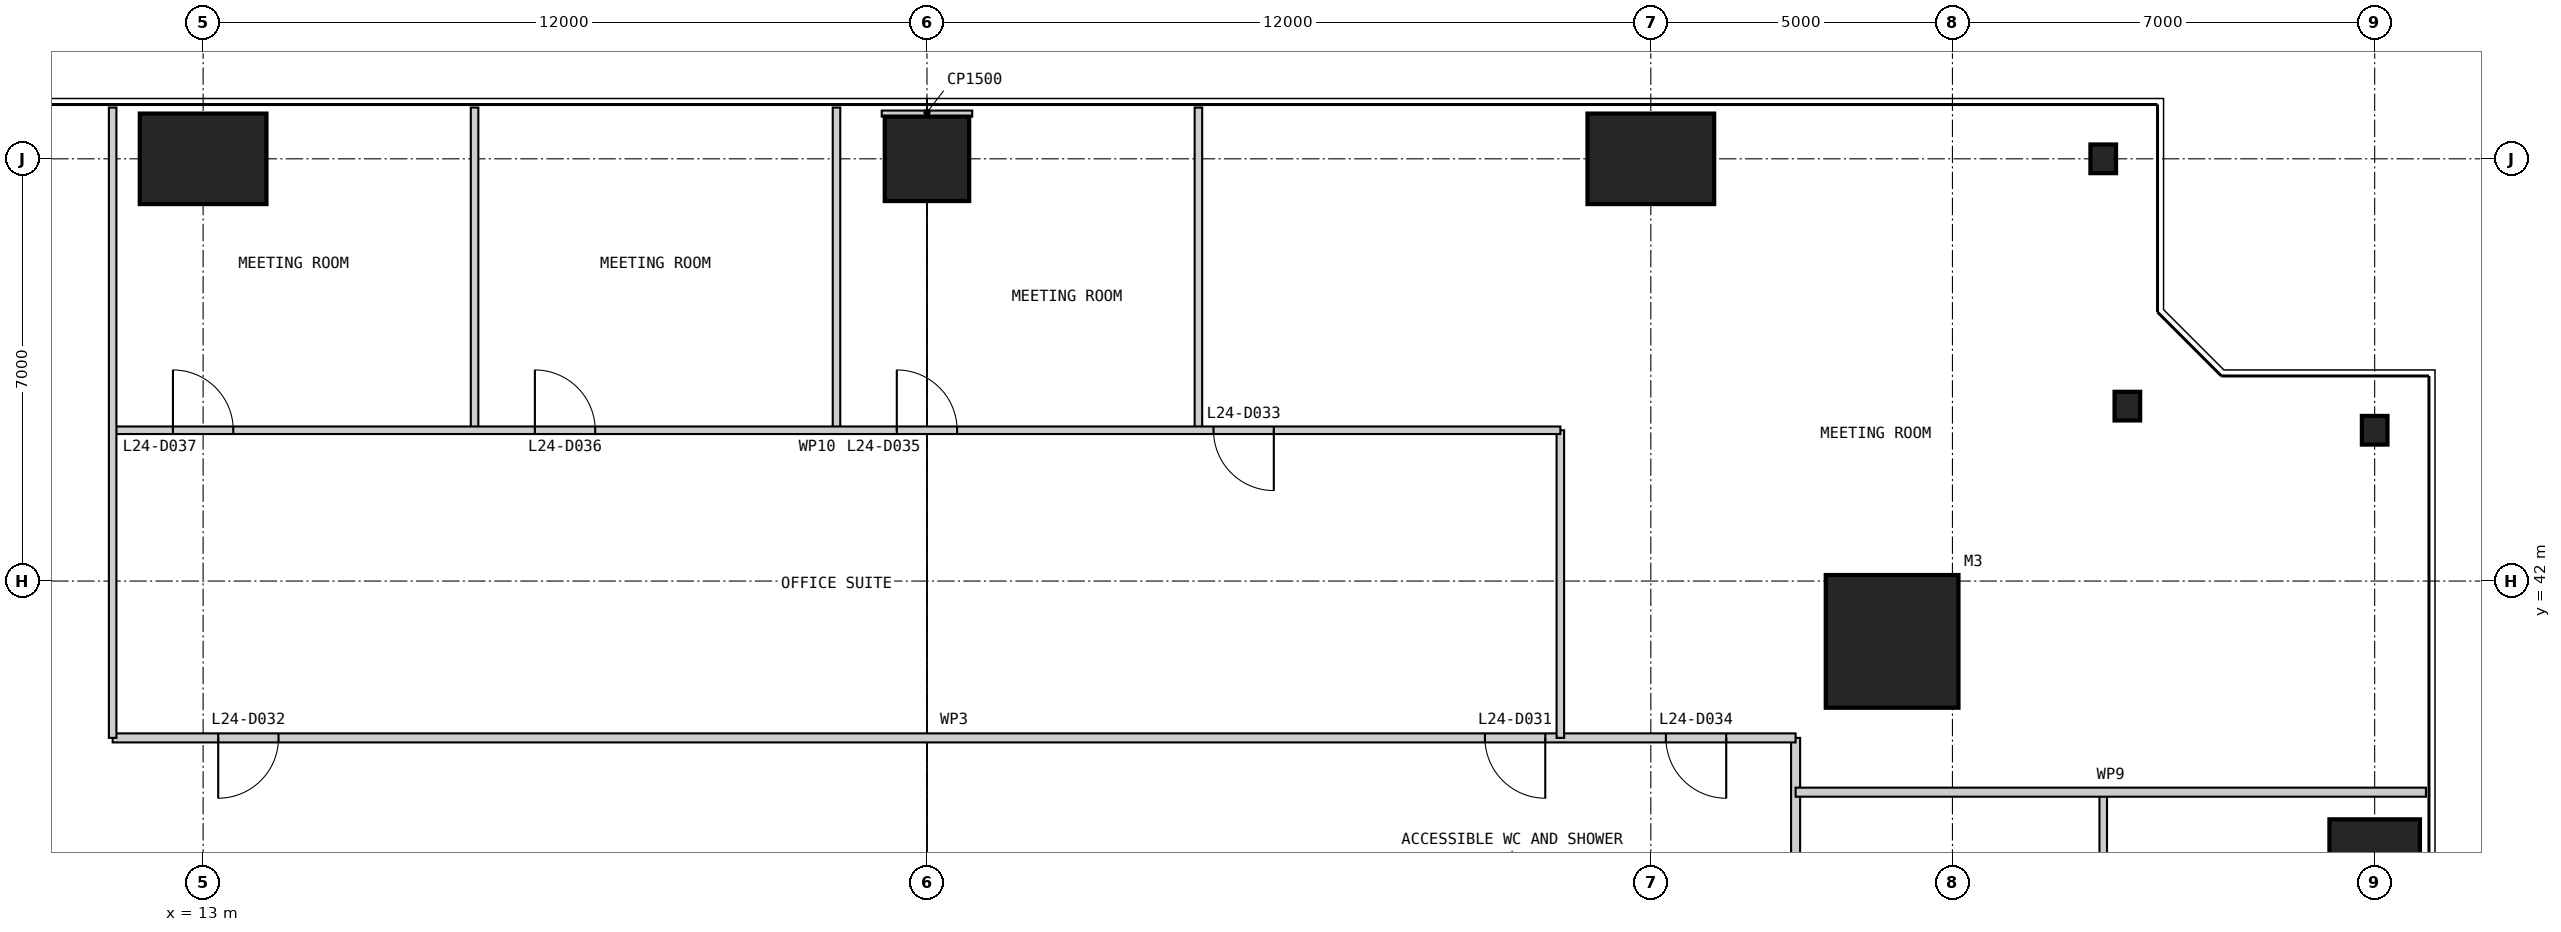
"""IFC4 building model, lengths in metres.
Left out: names, types, materials, properties, quantities, classifications, styles, units other than length and angle.
Written with IfcOpenShell. Run it as: python <this file> out.ifc"""

import sys

from ifc_helpers import new_model, si_unit, direction, frame, frame_2d, origin, origin_2d, place, context, subcontext, project, spatial, rectangle, i_section, extrude, element, fill, save


model = new_model("IFC4")
c1 = context("Model", 3, precision=1e-05, world=origin(), true_north=direction((0.0, 1.0)))
c2 = subcontext(c1, "Body", "Model", "MODEL_VIEW")
j1 = project(units=[si_unit("LENGTHUNIT", "METRE"), si_unit("PLANEANGLEUNIT", "RADIAN")], contexts=[c1])
p1 = place(None, origin())
s1 = spatial("IfcSite", under=j1, at=p1, CompositionType="ELEMENT")
p2 = place(p1, origin())
s2 = spatial("IfcBuilding", under=s1, at=p2, CompositionType="ELEMENT")
p3 = place(p2, frame((0.0, 0.0, 106.4)))
s3 = spatial("IfcBuildingStorey", under=s2, at=p3, CompositionType="ELEMENT", Elevation=106.4)
p4 = place(p3, frame((41.0, 41.0, 0.0), z_axis=(0.0, 0.0, 1.0), x_axis=(1.0, 0.0, 0.0)))
e1 = element("IfcColumn", 1, at=p4, inside=s3, PredefinedType="COLUMN", context=c2, shape_type="SweptSolid", body=[
    extrude(rectangle(XDim=2.2, YDim=2.2, at=origin_2d()), origin(), (0.0, 0.0, 1.0), 4.0),
])
p5 = place(p3, frame((49.0, 37.0, 0.0), z_axis=(0.0, 0.0, 1.0), x_axis=(1.0, 0.0, 0.0)))
e2 = element("IfcColumn", 2, at=p5, inside=s3, PredefinedType="COLUMN", context=c2, shape_type="SweptSolid", body=[
    extrude(rectangle(XDim=1.5, YDim=2.1, at=origin_2d()), origin(), (0.0, 0.0, 1.0), 4.0),
])
for number, where, z_axis, x_axis in (
    (3, (49.0, 44.5, 0.0), (0.0, 0.0, 1.0), (1.0, 0.0, 0.0)),
    (4, (44.9, 44.9, 0.0), (0.0, 0.0, 1.0), (1.0, 0.0, 0.0)),
    (5, (44.5, 49.0, 0.0), (0.0, 0.0, 1.0), (1.0, 0.0, 0.0)),
):
    element("IfcColumn", number, at=place(p3, frame(where, z_axis=z_axis, x_axis=x_axis)), inside=s3, PredefinedType="COLUMN", context=c2, shape_type="SweptSolid", body=[
        extrude(i_section(OverallWidth=0.424, OverallDepth=0.475, WebThickness=0.048, FlangeThickness=0.077, at=origin_2d()), origin(), (0.0, 0.0, 1.0), 4.0),
    ])
p6 = place(p3, frame((37.0, 49.0, 0.0), z_axis=(0.0, 0.0, 1.0), x_axis=(1.0, 0.0, 0.0)))
e6 = element("IfcColumn", 6, at=p6, inside=s3, PredefinedType="COLUMN", context=c2, shape_type="SweptSolid", body=[
    extrude(rectangle(XDim=2.1, YDim=1.5, at=origin_2d()), origin(), (0.0, 0.0, 1.0), 4.0),
])
p7 = place(p3, frame((25.0, 49.0, 0.0), z_axis=(0.0, 0.0, 1.0), x_axis=(1.0, 0.0, 0.0)))
e7 = element("IfcColumn", 7, at=p7, inside=s3, PredefinedType="COLUMN", context=c2, shape_type="SweptSolid", body=[
    extrude(rectangle(XDim=1.4, YDim=1.4, at=origin_2d()), origin(), (0.0, 0.0, 1.0), 4.0),
])
p8 = place(p3, frame((13.0, 49.0, 0.0), z_axis=(0.0, 0.0, 1.0), x_axis=(1.0, 0.0, 0.0)))
e8 = element("IfcColumn", 8, at=p8, inside=s3, PredefinedType="COLUMN", context=c2, shape_type="SweptSolid", body=[
    extrude(rectangle(XDim=2.1, YDim=1.5, at=origin_2d()), origin(), (0.0, 0.0, 1.0), 4.0),
])
p9 = place(p3, frame((39.4, 10.6, 0.0), z_axis=(0.0, 0.0, 1.0), x_axis=(0.0, 1.0, 0.0)))
e9 = element("IfcWall", 9, at=p9, inside=s3, PredefinedType="PARTITIONING", context=c2, shape_type="SweptSolid", body=[
    extrude(rectangle(XDim=28.8, YDim=0.15, at=frame_2d((14.4, 0.0))), origin(), (0.0, 0.0, 1.0), 3.85),
])
p10 = place(p9, frame((12.4, 0.0, 0.0)))
e10 = element("IfcOpeningElement", 10, at=p10, cuts=e9, PredefinedType="OPENING", context=c2, shape_type="SweptSolid", body=[
    extrude(rectangle(XDim=1.0, YDim=2.2, at=frame_2d((0.5, 1.1))), frame((0.0, 0.085, 0.0), z_axis=(0.0, -1.0, 0.0), x_axis=(1.0, 0.0, 0.0)), (0.0, 0.0, 1.0), 0.17),
])
p11 = place(p3, frame((44.5, 14.5, 0.0), z_axis=(0.0, 0.0, 1.0), x_axis=(0.0, 1.0, 0.0)))
e11 = element("IfcWall", 11, at=p11, inside=s3, PredefinedType="PARTITIONING", context=c2, shape_type="SweptSolid", body=[
    extrude(rectangle(XDim=24.0, YDim=0.125, at=frame_2d((12.0, 0.0))), origin(), (0.0, 0.0, 1.0), 3.85),
])
p12 = place(p11, frame((10.05, 0.0, 0.0)))
e12 = element("IfcOpeningElement", 12, at=p12, cuts=e11, PredefinedType="OPENING", context=c2, shape_type="SweptSolid", body=[
    extrude(rectangle(XDim=0.9, YDim=2.2, at=frame_2d((0.45, 1.1))), frame((0.0, 0.073, 0.0), z_axis=(0.0, -1.0, 0.0), x_axis=(1.0, 0.0, 0.0)), (0.0, 0.0, 1.0), 0.145),
])
p13 = place(p11, frame((16.05, 0.0, 0.0)))
e13 = element("IfcOpeningElement", 13, at=p13, cuts=e11, PredefinedType="OPENING", context=c2, shape_type="SweptSolid", body=[
    extrude(rectangle(XDim=0.9, YDim=2.2, at=frame_2d((0.45, 1.1))), frame((0.0, 0.073, 0.0), z_axis=(0.0, -1.0, 0.0), x_axis=(1.0, 0.0, 0.0)), (0.0, 0.0, 1.0), 0.145),
])
p14 = place(p11, frame((19.0, 0.0, 0.0)))
e14 = element("IfcOpeningElement", 14, at=p14, cuts=e11, PredefinedType="OPENING", context=c2, shape_type="SweptSolid", body=[
    extrude(rectangle(XDim=1.0, YDim=2.2, at=frame_2d((0.5, 1.1))), frame((0.0, 0.073, 0.0), z_axis=(0.0, -1.0, 0.0), x_axis=(1.0, 0.0, 0.0)), (0.0, 0.0, 1.0), 0.145),
])
p15 = place(p3, frame((39.4, 39.4, 0.0), z_axis=(0.0, 0.0, 1.0), x_axis=(-1.0, 0.0, 0.0)))
e15 = element("IfcWall", 15, at=p15, inside=s3, PredefinedType="PARTITIONING", context=c2, shape_type="SweptSolid", body=[
    extrude(rectangle(XDim=27.9, YDim=0.15, at=frame_2d((13.95, 0.0))), origin(), (0.0, 0.0, 1.0), 3.85),
])
p16 = place(p15, frame((4.15, 0.0, 0.0)))
e16 = element("IfcOpeningElement", 16, at=p16, cuts=e15, PredefinedType="OPENING", context=c2, shape_type="SweptSolid", body=[
    extrude(rectangle(XDim=1.0, YDim=2.2, at=frame_2d((0.5, 1.1))), frame((0.0, 0.085, 0.0), z_axis=(0.0, -1.0, 0.0), x_axis=(1.0, 0.0, 0.0)), (0.0, 0.0, 1.0), 0.17),
])
p17 = place(p15, frame((25.15, 0.0, 0.0)))
e17 = element("IfcOpeningElement", 17, at=p17, cuts=e15, PredefinedType="OPENING", context=c2, shape_type="SweptSolid", body=[
    extrude(rectangle(XDim=1.0, YDim=2.2, at=frame_2d((0.5, 1.1))), frame((0.0, 0.085, 0.0), z_axis=(0.0, -1.0, 0.0), x_axis=(1.0, 0.0, 0.0)), (0.0, 0.0, 1.0), 0.17),
])
p18 = place(p15, frame((1.15, 0.0, 0.0)))
e18 = element("IfcOpeningElement", 18, at=p18, cuts=e15, PredefinedType="OPENING", context=c2, shape_type="SweptSolid", body=[
    extrude(rectangle(XDim=1.0, YDim=2.2, at=frame_2d((0.5, 1.1))), frame((0.0, 0.085, 0.0), z_axis=(0.0, -1.0, 0.0), x_axis=(1.0, 0.0, 0.0)), (0.0, 0.0, 1.0), 0.17),
])
p19 = place(p3, frame((49.85, 38.5, 0.0), z_axis=(0.0, 0.0, 1.0), x_axis=(-1.0, 0.0, 0.0)))
e19 = element("IfcWall", 19, at=p19, inside=s3, PredefinedType="PARTITIONING", context=c2, shape_type="SweptSolid", body=[
    extrude(rectangle(XDim=10.45, YDim=0.15, at=frame_2d((5.225, 0.0))), origin(), (0.0, 0.0, 1.0), 3.85),
])
p20 = place(p3, frame((35.5, 44.5, 0.0), z_axis=(0.0, 0.0, 1.0), x_axis=(0.0, -1.0, 0.0)))
e20 = element("IfcWall", 20, at=p20, inside=s3, PredefinedType="PARTITIONING", context=c2, shape_type="SweptSolid", body=[
    extrude(rectangle(XDim=5.1, YDim=0.125, at=frame_2d((2.55, 0.0))), origin(), (0.0, 0.0, 1.0), 3.85),
])
for number, where, z_axis, x_axis in (
    (21, (29.5, 49.85, 0.0), (0.0, 0.0, 1.0), (0.0, -1.0, 0.0)),
    (22, (23.5, 49.85, 0.0), (0.0, 0.0, 1.0), (0.0, -1.0, 0.0)),
    (23, (17.5, 49.85, 0.0), (0.0, 0.0, 1.0), (0.0, -1.0, 0.0)),
):
    element("IfcWall", number, at=place(p3, frame(where, z_axis=z_axis, x_axis=x_axis)), inside=s3, PredefinedType="PARTITIONING", context=c2, shape_type="SweptSolid", body=[
        extrude(rectangle(XDim=5.35, YDim=0.125, at=frame_2d((2.675, 0.0))), origin(), (0.0, 0.0, 1.0), 3.85),
    ])
p21 = place(p3, frame((35.5, 44.5, 0.0), z_axis=(0.0, 0.0, 1.0), x_axis=(-1.0, 0.0, 0.0)))
e24 = element("IfcWall", 24, at=p21, inside=s3, PredefinedType="PARTITIONING", context=c2, shape_type="SweptSolid", body=[
    extrude(rectangle(XDim=24.0, YDim=0.125, at=frame_2d((12.0, 0.0))), origin(), (0.0, 0.0, 1.0), 3.85),
])
p22 = place(p21, frame((4.75, 0.0, 0.0)))
e25 = element("IfcOpeningElement", 25, at=p22, cuts=e24, PredefinedType="OPENING", context=c2, shape_type="SweptSolid", body=[
    extrude(rectangle(XDim=1.0, YDim=2.2, at=frame_2d((0.5, 1.1))), frame((0.0, 0.073, 0.0), z_axis=(0.0, -1.0, 0.0), x_axis=(1.0, 0.0, 0.0)), (0.0, 0.0, 1.0), 0.145),
])
p23 = place(p21, frame((10.0, 0.0, 0.0)))
e26 = element("IfcOpeningElement", 26, at=p23, cuts=e24, PredefinedType="OPENING", context=c2, shape_type="SweptSolid", body=[
    extrude(rectangle(XDim=1.0, YDim=2.2, at=frame_2d((0.5, 1.1))), frame((0.0, 0.073, 0.0), z_axis=(0.0, -1.0, 0.0), x_axis=(1.0, 0.0, 0.0)), (0.0, 0.0, 1.0), 0.145),
])
p24 = place(p21, frame((16.0, 0.0, 0.0)))
e27 = element("IfcOpeningElement", 27, at=p24, cuts=e24, PredefinedType="OPENING", context=c2, shape_type="SweptSolid", body=[
    extrude(rectangle(XDim=1.0, YDim=2.2, at=frame_2d((0.5, 1.1))), frame((0.0, 0.073, 0.0), z_axis=(0.0, -1.0, 0.0), x_axis=(1.0, 0.0, 0.0)), (0.0, 0.0, 1.0), 0.145),
])
p25 = place(p21, frame((22.0, 0.0, 0.0)))
e28 = element("IfcOpeningElement", 28, at=p25, cuts=e24, PredefinedType="OPENING", context=c2, shape_type="SweptSolid", body=[
    extrude(rectangle(XDim=1.0, YDim=2.2, at=frame_2d((0.5, 1.1))), frame((0.0, 0.073, 0.0), z_axis=(0.0, -1.0, 0.0), x_axis=(1.0, 0.0, 0.0)), (0.0, 0.0, 1.0), 0.145),
])
p26 = place(p3, frame((11.5, 49.85, 0.0), z_axis=(0.0, 0.0, 1.0), x_axis=(0.0, -1.0, 0.0)))
e29 = element("IfcWall", 29, at=p26, inside=s3, PredefinedType="PARTITIONING", context=c2, shape_type="SweptSolid", body=[
    extrude(rectangle(XDim=10.45, YDim=0.125, at=frame_2d((5.225, 0.0))), origin(), (0.0, 0.0, 1.0), 3.85),
])
p27 = place(p3, frame((25.0, 49.8, 0.0), z_axis=(0.0, 0.0, 1.0), x_axis=(0.0, -1.0, 0.0)))
e30 = element("IfcWall", 30, at=p27, inside=s3, PredefinedType="PARTITIONING", context=c2, shape_type="SweptSolid", body=[
    extrude(rectangle(XDim=0.1, YDim=1.5, at=frame_2d((0.05, 0.0))), origin(), (0.0, 0.0, 1.0), 3.85),
])
p28 = place(p16, origin())
e31 = element("IfcDoor", 31, at=p28, inside=s3, OperationType="SINGLE_SWING_LEFT", PredefinedType="DOOR", context=c2, shape_type="SweptSolid", body=[
    extrude(rectangle(XDim=1.0, YDim=2.2, at=frame_2d((0.5, 1.1))), frame((0.0, 0.025, 0.0), z_axis=(0.0, -1.0, 0.0), x_axis=(1.0, 0.0, 0.0)), (0.0, 0.0, 1.0), 0.05),
])
fill(e16, e31)
p29 = place(p17, origin())
e32 = element("IfcDoor", 32, at=p29, inside=s3, OperationType="SINGLE_SWING_RIGHT", PredefinedType="DOOR", context=c2, shape_type="SweptSolid", body=[
    extrude(rectangle(XDim=1.0, YDim=2.2, at=frame_2d((0.5, 1.1))), frame((0.0, 0.025, 0.0), z_axis=(0.0, -1.0, 0.0), x_axis=(1.0, 0.0, 0.0)), (0.0, 0.0, 1.0), 0.05),
])
fill(e17, e32)
p30 = place(p22, origin())
e33 = element("IfcDoor", 33, at=p30, inside=s3, OperationType="SINGLE_SWING_LEFT", PredefinedType="DOOR", context=c2, shape_type="SweptSolid", body=[
    extrude(rectangle(XDim=1.0, YDim=2.2, at=frame_2d((0.5, 1.1))), frame((0.0, 0.025, 0.0), z_axis=(0.0, -1.0, 0.0), x_axis=(1.0, 0.0, 0.0)), (0.0, 0.0, 1.0), 0.05),
])
fill(e25, e33)
p31 = place(p18, origin())
e34 = element("IfcDoor", 34, at=p31, inside=s3, OperationType="SINGLE_SWING_LEFT", PredefinedType="DOOR", context=c2, shape_type="SweptSolid", body=[
    extrude(rectangle(XDim=1.0, YDim=2.2, at=frame_2d((0.5, 1.1))), frame((0.0, 0.025, 0.0), z_axis=(0.0, -1.0, 0.0), x_axis=(1.0, 0.0, 0.0)), (0.0, 0.0, 1.0), 0.05),
])
fill(e18, e34)
p32 = place(p23, frame((1.0, 0.0, 0.0), z_axis=(0.0, 0.0, 1.0), x_axis=(-1.0, 0.0, 0.0)))
e35 = element("IfcDoor", 35, at=p32, inside=s3, OperationType="SINGLE_SWING_LEFT", PredefinedType="DOOR", context=c2, shape_type="SweptSolid", body=[
    extrude(rectangle(XDim=1.0, YDim=2.2, at=frame_2d((0.5, 1.1))), frame((0.0, 0.025, 0.0), z_axis=(0.0, -1.0, 0.0), x_axis=(1.0, 0.0, 0.0)), (0.0, 0.0, 1.0), 0.05),
])
fill(e26, e35)
p33 = place(p24, frame((1.0, 0.0, 0.0), z_axis=(0.0, 0.0, 1.0), x_axis=(-1.0, 0.0, 0.0)))
e36 = element("IfcDoor", 36, at=p33, inside=s3, OperationType="SINGLE_SWING_LEFT", PredefinedType="DOOR", context=c2, shape_type="SweptSolid", body=[
    extrude(rectangle(XDim=1.0, YDim=2.2, at=frame_2d((0.5, 1.1))), frame((0.0, 0.025, 0.0), z_axis=(0.0, -1.0, 0.0), x_axis=(1.0, 0.0, 0.0)), (0.0, 0.0, 1.0), 0.05),
])
fill(e27, e36)
p34 = place(p25, frame((1.0, 0.0, 0.0), z_axis=(0.0, 0.0, 1.0), x_axis=(-1.0, 0.0, 0.0)))
e37 = element("IfcDoor", 37, at=p34, inside=s3, OperationType="SINGLE_SWING_LEFT", PredefinedType="DOOR", context=c2, shape_type="SweptSolid", body=[
    extrude(rectangle(XDim=1.0, YDim=2.2, at=frame_2d((0.5, 1.1))), frame((0.0, 0.025, 0.0), z_axis=(0.0, -1.0, 0.0), x_axis=(1.0, 0.0, 0.0)), (0.0, 0.0, 1.0), 0.05),
])
fill(e28, e37)
save(model, sys.argv[1])
